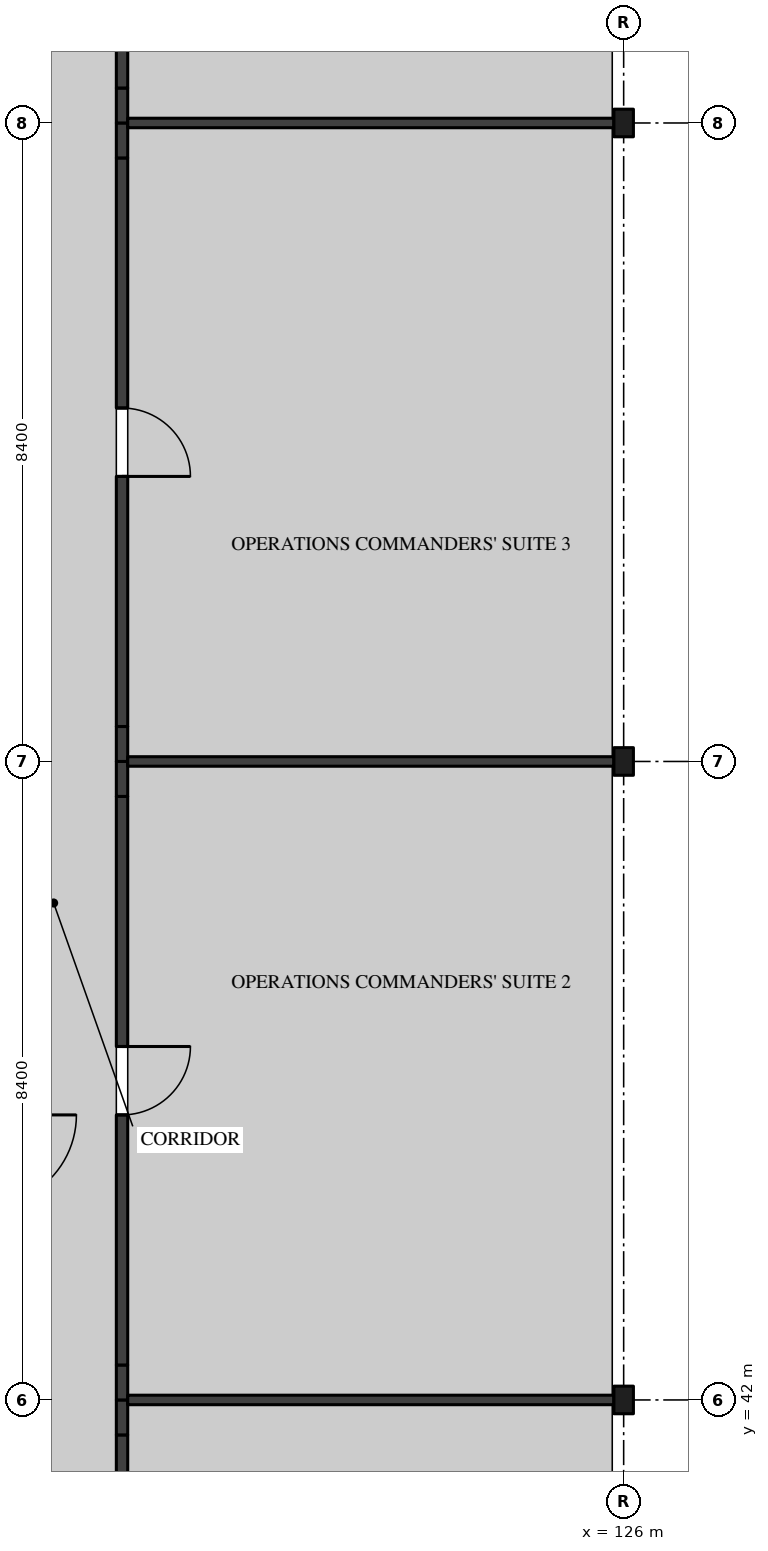
"""IFC4 building model, lengths in metres.
Left out: names, types, materials, properties, quantities, classifications, styles, units other than length and angle.
Written with IfcOpenShell. Run it as: python <this file> out.ifc"""

import sys

from ifc_helpers import new_model, si_unit, direction, frame, frame_2d, origin, origin_2d, place, context, subcontext, project, spatial, rectangle, i_section, extrude, element, fill, save


model = new_model("IFC4")
c1 = context("Model", 3, precision=1e-05, world=origin(), true_north=direction((0.0, 1.0)))
c2 = subcontext(c1, "Body", "Model", "MODEL_VIEW")
j1 = project(units=[si_unit("LENGTHUNIT", "METRE"), si_unit("PLANEANGLEUNIT", "RADIAN")], contexts=[c1])
p1 = place(None, origin())
s1 = spatial("IfcSite", under=j1, at=p1, CompositionType="ELEMENT")
p2 = place(p1, origin())
s2 = spatial("IfcBuilding", under=s1, at=p2, CompositionType="ELEMENT")
p3 = place(p2, frame((0.0, 0.0, 36.9)))
s3 = spatial("IfcBuildingStorey", under=s2, at=p3, CompositionType="ELEMENT", Elevation=36.9)
for number, where, z_axis, x_axis in (
    (1, (126.0, 42.0, 0.0), (0.0, 0.0, 1.0), (1.0, 0.0, 0.0)),
    (2, (126.0, 50.4, 0.0), (0.0, 0.0, 1.0), (1.0, 0.0, 0.0)),
    (3, (126.0, 58.8, 0.0), (0.0, 0.0, 1.0), (1.0, 0.0, 0.0)),
):
    element("IfcColumn", number, at=place(p3, frame(where, z_axis=z_axis, x_axis=x_axis)), inside=s3, PredefinedType="COLUMN", context=c2, shape_type="SweptSolid", body=[
        extrude(i_section(OverallWidth=0.257, OverallDepth=0.363, WebThickness=0.013, FlangeThickness=0.022, FilletRadius=0.015, at=origin_2d()), origin(), (0.0, 0.0, 1.0), 4.37),
    ])
p4 = place(p3, frame((119.4, 33.75, 0.0), z_axis=(0.0, 0.0, 1.0), x_axis=(0.0, 1.0, 0.0)))
e4 = element("IfcWall", 4, at=p4, inside=s3, PredefinedType="PARTITIONING", context=c2, shape_type="SweptSolid", body=[
    extrude(rectangle(XDim=7.79, YDim=0.15, at=frame_2d((3.895, 0.0))), origin(), (0.0, 0.0, 1.0), 4.37),
])
p5 = place(p4, frame((3.6, 0.0, 0.0)))
e5 = element("IfcOpeningElement", 5, at=p5, cuts=e4, PredefinedType="OPENING", context=c2, shape_type="SweptSolid", body=[
    extrude(rectangle(XDim=0.9, YDim=2.1, at=frame_2d((0.45, 1.05))), frame((0.0, 0.085, 0.0), z_axis=(0.0, -1.0, 0.0), x_axis=(1.0, 0.0, 0.0)), (0.0, 0.0, 1.0), 0.17),
])
for number, where, z_axis, x_axis in (
    (6, (119.4, 41.54, 0.0), (0.0, 0.0, 1.0), (0.0, 1.0, 0.0)),
    (7, (119.4, 42.0, 0.0), (0.0, 0.0, 1.0), (0.0, 1.0, 0.0)),
):
    element("IfcWall", number, at=place(p3, frame(where, z_axis=z_axis, x_axis=x_axis)), inside=s3, PredefinedType="PARTITIONING", context=c2, shape_type="SweptSolid", body=[
        extrude(rectangle(XDim=0.46, YDim=0.15, at=frame_2d((0.23, 0.0))), origin(), (0.0, 0.0, 1.0), 3.817),
    ])
p6 = place(p3, frame((119.4, 42.46, 0.0), z_axis=(0.0, 0.0, 1.0), x_axis=(0.0, 1.0, 0.0)))
e8 = element("IfcWall", 8, at=p6, inside=s3, PredefinedType="PARTITIONING", context=c2, shape_type="SweptSolid", body=[
    extrude(rectangle(XDim=7.48, YDim=0.15, at=frame_2d((3.74, 0.0))), origin(), (0.0, 0.0, 1.0), 4.37),
])
p7 = place(p6, frame((3.29, 0.0, 0.0)))
e9 = element("IfcOpeningElement", 9, at=p7, cuts=e8, PredefinedType="OPENING", context=c2, shape_type="SweptSolid", body=[
    extrude(rectangle(XDim=0.9, YDim=2.1, at=frame_2d((0.45, 1.05))), frame((0.0, 0.085, 0.0), z_axis=(0.0, -1.0, 0.0), x_axis=(1.0, 0.0, 0.0)), (0.0, 0.0, 1.0), 0.17),
])
p8 = place(p3, frame((119.4, 49.94, 0.0), z_axis=(0.0, 0.0, 1.0), x_axis=(0.0, 1.0, 0.0)))
e10 = element("IfcWall", 10, at=p8, inside=s3, PredefinedType="PARTITIONING", context=c2, shape_type="SweptSolid", body=[
    extrude(rectangle(XDim=0.46, YDim=0.15, at=frame_2d((0.23, 0.0))), origin(), (0.0, 0.0, 1.0), 3.817),
])
p9 = place(p3, frame((119.4, 50.4, 0.0), z_axis=(0.0, 0.0, 1.0), x_axis=(0.0, 1.0, 0.0)))
e11 = element("IfcWall", 11, at=p9, inside=s3, PredefinedType="PARTITIONING", context=c2, shape_type="SweptSolid", body=[
    extrude(rectangle(XDim=0.46, YDim=0.15, at=frame_2d((0.23, 0.0))), origin(), (0.0, 0.0, 1.0), 3.817),
])
p10 = place(p3, frame((119.4, 50.86, 0.0), z_axis=(0.0, 0.0, 1.0), x_axis=(0.0, 1.0, 0.0)))
e12 = element("IfcWall", 12, at=p10, inside=s3, PredefinedType="PARTITIONING", context=c2, shape_type="SweptSolid", body=[
    extrude(rectangle(XDim=7.48, YDim=0.15, at=frame_2d((3.74, 0.0))), origin(), (0.0, 0.0, 1.0), 4.37),
])
p11 = place(p10, frame((3.29, 0.0, 0.0)))
e13 = element("IfcOpeningElement", 13, at=p11, cuts=e12, PredefinedType="OPENING", context=c2, shape_type="SweptSolid", body=[
    extrude(rectangle(XDim=0.9, YDim=2.1, at=frame_2d((0.45, 1.05))), frame((0.0, 0.085, 0.0), z_axis=(0.0, -1.0, 0.0), x_axis=(1.0, 0.0, 0.0)), (0.0, 0.0, 1.0), 0.17),
])
for number, where, z_axis, x_axis in (
    (14, (119.4, 58.34, 0.0), (0.0, 0.0, 1.0), (0.0, 1.0, 0.0)),
    (15, (119.4, 58.8, 0.0), (0.0, 0.0, 1.0), (0.0, 1.0, 0.0)),
):
    element("IfcWall", number, at=place(p3, frame(where, z_axis=z_axis, x_axis=x_axis)), inside=s3, PredefinedType="PARTITIONING", context=c2, shape_type="SweptSolid", body=[
        extrude(rectangle(XDim=0.46, YDim=0.15, at=frame_2d((0.23, 0.0))), origin(), (0.0, 0.0, 1.0), 3.817),
    ])
p12 = place(p3, frame((119.4, 59.26, 0.0), z_axis=(0.0, 0.0, 1.0), x_axis=(0.0, 1.0, 0.0)))
e16 = element("IfcWall", 16, at=p12, inside=s3, PredefinedType="PARTITIONING", context=c2, shape_type="SweptSolid", body=[
    extrude(rectangle(XDim=7.79, YDim=0.15, at=frame_2d((3.895, 0.0))), origin(), (0.0, 0.0, 1.0), 4.37),
])
p13 = place(p12, frame((3.14, 0.0, 0.0)))
e17 = element("IfcOpeningElement", 17, at=p13, cuts=e16, PredefinedType="OPENING", context=c2, shape_type="SweptSolid", body=[
    extrude(rectangle(XDim=1.2, YDim=2.4, at=frame_2d((0.6, 1.2))), frame((0.0, 0.085, 0.0), z_axis=(0.0, -1.0, 0.0), x_axis=(1.0, 0.0, 0.0)), (0.0, 0.0, 1.0), 0.17),
])
for number, where, z_axis, x_axis in (
    (18, (119.475, 42.0, 0.0), (0.0, 0.0, 1.0), (1.0, 0.0, 0.0)),
    (19, (119.475, 50.4, 0.0), (0.0, 0.0, 1.0), (1.0, 0.0, 0.0)),
    (20, (119.475, 58.8, 0.0), (0.0, 0.0, 1.0), (1.0, 0.0, 0.0)),
):
    element("IfcWall", number, at=place(p3, frame(where, z_axis=z_axis, x_axis=x_axis)), inside=s3, PredefinedType="PARTITIONING", context=c2, shape_type="SweptSolid", body=[
        extrude(rectangle(XDim=6.396, YDim=0.125, at=frame_2d((3.198, 0.0))), origin(), (0.0, 0.0, 1.0), 3.817),
    ])
p14 = place(p7, frame((0.9, 0.0, 0.0), z_axis=(0.0, 0.0, 1.0), x_axis=(-1.0, 0.0, 0.0)))
e21 = element("IfcDoor", 21, at=p14, inside=s3, OperationType="SINGLE_SWING_RIGHT", PredefinedType="DOOR", context=c2, shape_type="SweptSolid", body=[
    extrude(rectangle(XDim=0.9, YDim=2.1, at=frame_2d((0.45, 1.05))), frame((0.0, 0.025, 0.0), z_axis=(0.0, -1.0, 0.0), x_axis=(1.0, 0.0, 0.0)), (0.0, 0.0, 1.0), 0.05),
])
fill(e9, e21)
p15 = place(p11, frame((0.9, 0.0, 0.0), z_axis=(0.0, 0.0, 1.0), x_axis=(-1.0, 0.0, 0.0)))
e22 = element("IfcDoor", 22, at=p15, inside=s3, OperationType="SINGLE_SWING_LEFT", PredefinedType="DOOR", context=c2, shape_type="SweptSolid", body=[
    extrude(rectangle(XDim=0.9, YDim=2.1, at=frame_2d((0.45, 1.05))), frame((0.0, 0.025, 0.0), z_axis=(0.0, -1.0, 0.0), x_axis=(1.0, 0.0, 0.0)), (0.0, 0.0, 1.0), 0.05),
])
fill(e13, e22)
save(model, sys.argv[1])
